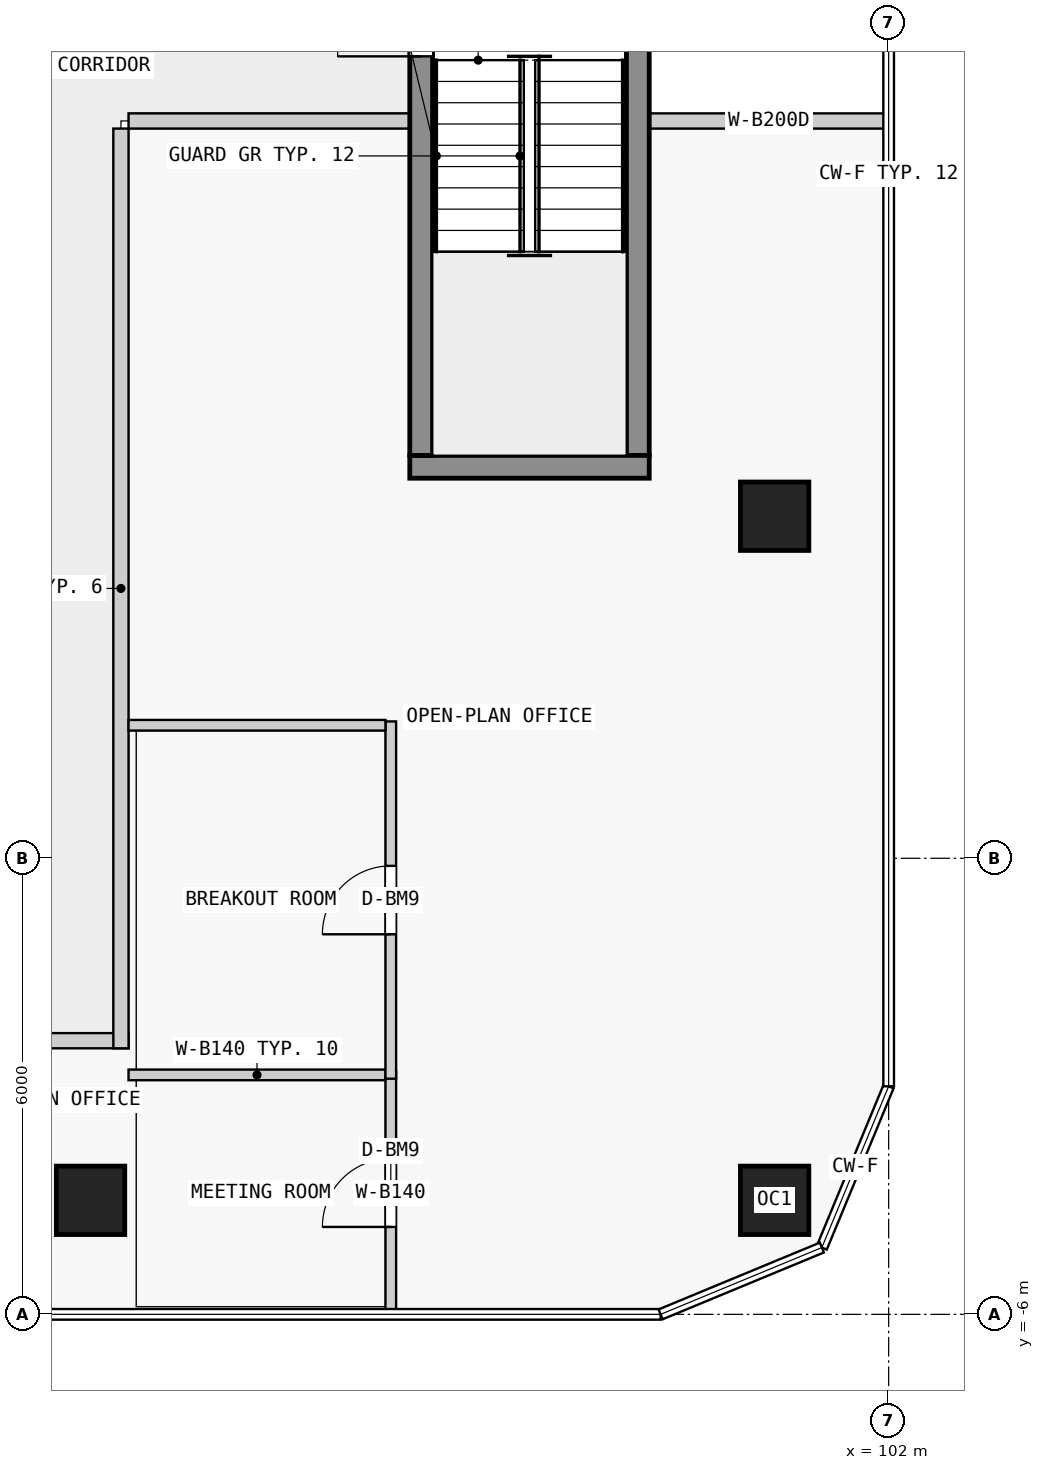
"""IFC4 building model, lengths in metres.
Left out: names, types, materials, properties, quantities, classifications, styles, units other than length and angle.
Written with IfcOpenShell. Run it as: python <this file> out.ifc"""

import sys

from ifc_helpers import new_model, si_unit, direction, frame, frame_2d, origin, origin_2d, place, context, subcontext, project, spatial, rectangle, extrude, element, fill, save


model = new_model("IFC4")
c1 = context("Model", 3, precision=1e-05, world=origin(), true_north=direction((0.0, 1.0)))
c2 = subcontext(c1, "Body", "Model", "MODEL_VIEW")
j1 = project(units=[si_unit("LENGTHUNIT", "METRE"), si_unit("PLANEANGLEUNIT", "RADIAN")], contexts=[c1])
p1 = place(None, origin())
s1 = spatial("IfcSite", under=j1, at=p1, CompositionType="ELEMENT")
p2 = place(p1, origin())
s2 = spatial("IfcBuilding", under=s1, at=p2, CompositionType="ELEMENT")
p3 = place(p2, frame((0.0, 0.0, 65.3)))
s3 = spatial("IfcBuildingStorey", under=s2, at=p3, CompositionType="ELEMENT", Elevation=65.3)
for number, where, z_axis, x_axis in (
    (1, (91.5, -4.5, 0.0), (0.0, 0.0, 1.0), (1.0, 0.0, 0.0)),
    (2, (100.5, -4.5, 0.0), (0.0, 0.0, 1.0), (1.0, 0.0, 0.0)),
    (3, (100.5, 4.5, 0.0), (0.0, 0.0, 1.0), (1.0, 0.0, 0.0)),
):
    element("IfcColumn", number, at=place(p3, frame(where, z_axis=z_axis, x_axis=x_axis)), inside=s3, PredefinedType="COLUMN", context=c2, shape_type="SweptSolid", body=[
        extrude(rectangle(XDim=0.9, YDim=0.9, at=origin_2d()), origin(), (0.0, 0.0, 1.0), 3.5),
    ])
p4 = place(p3, frame((95.85, 5.3, 0.0), z_axis=(0.0, 0.0, 1.0), x_axis=(0.0, 1.0, 0.0)))
e4 = element("IfcWall", 4, at=p4, inside=s3, PredefinedType="SHEAR", context=c2, shape_type="SweptSolid", body=[
    extrude(rectangle(XDim=6.4, YDim=0.3, at=frame_2d((3.2, 0.0))), origin(), (0.0, 0.0, 1.0), 3.25),
])
p5 = place(p4, frame((5.25, 0.0, 0.0)))
e5 = element("IfcOpeningElement", 5, at=p5, cuts=e4, PredefinedType="OPENING", context=c2, shape_type="SweptSolid", body=[
    extrude(rectangle(XDim=1.1, YDim=2.1, at=frame_2d((0.55, 1.05))), frame((0.0, 0.16, 0.0), z_axis=(0.0, -1.0, 0.0), x_axis=(1.0, 0.0, 0.0)), (0.0, 0.0, 1.0), 0.32),
])
p6 = place(p3, frame((98.7, 5.3, 0.0), z_axis=(0.0, 0.0, 1.0), x_axis=(0.0, 1.0, 0.0)))
e6 = element("IfcWall", 6, at=p6, inside=s3, PredefinedType="SHEAR", context=c2, shape_type="SweptSolid", body=[
    extrude(rectangle(XDim=6.4, YDim=0.3, at=frame_2d((3.2, 0.0))), origin(), (0.0, 0.0, 1.0), 3.25),
])
p7 = place(p3, frame((95.7, 5.15, 0.0), z_axis=(0.0, 0.0, 1.0), x_axis=(1.0, 0.0, 0.0)))
e7 = element("IfcWall", 7, at=p7, inside=s3, PredefinedType="SHEAR", context=c2, shape_type="SweptSolid", body=[
    extrude(rectangle(XDim=3.15, YDim=0.3, at=frame_2d((1.575, 0.0))), origin(), (0.0, 0.0, 1.0), 3.25),
])
p8 = place(p3, frame((72.0, -2.4, 0.0), z_axis=(0.0, 0.0, 1.0), x_axis=(1.0, 0.0, 0.0)))
e8 = element("IfcWall", 8, at=p8, inside=s3, PredefinedType="PARTITIONING", context=c2, shape_type="SweptSolid", body=[
    extrude(rectangle(XDim=20.0, YDim=0.2, at=frame_2d((10.0, 0.0))), origin(), (0.0, 0.0, 1.0), 3.25),
])
p9 = place(p8, frame((11.3, 0.0, 0.0)))
e9 = element("IfcOpeningElement", 9, at=p9, cuts=e8, PredefinedType="OPENING", context=c2, shape_type="SweptSolid", body=[
    extrude(rectangle(XDim=1.4, YDim=2.4, at=frame_2d((0.7, 1.2))), frame((0.0, 0.11, 0.0), z_axis=(0.0, -1.0, 0.0), x_axis=(1.0, 0.0, 0.0)), (0.0, 0.0, 1.0), 0.22),
])
p10 = place(p3, frame((91.9, -2.5, 0.0), z_axis=(0.0, 0.0, 1.0), x_axis=(0.0, 1.0, 0.0)))
e10 = element("IfcWall", 10, at=p10, inside=s3, PredefinedType="PARTITIONING", context=c2, shape_type="SweptSolid", body=[
    extrude(rectangle(XDim=12.1, YDim=0.2, at=frame_2d((6.05, 0.0))), origin(), (0.0, 0.0, 1.0), 3.25),
])
p11 = place(p3, frame((92.0, 9.7, 0.0), z_axis=(0.0, 0.0, 1.0), x_axis=(1.0, 0.0, 0.0)))
e11 = element("IfcWall", 11, at=p11, inside=s3, PredefinedType="PARTITIONING", context=c2, shape_type="SweptSolid", body=[
    extrude(rectangle(XDim=3.7, YDim=0.2, at=frame_2d((1.85, 0.0))), origin(), (0.0, 0.0, 1.0), 3.25),
])
p12 = place(p3, frame((98.85, 9.7, 0.0), z_axis=(0.0, 0.0, 1.0), x_axis=(1.0, 0.0, 0.0)))
e12 = element("IfcWall", 12, at=p12, inside=s3, PredefinedType="PARTITIONING", context=c2, shape_type="SweptSolid", body=[
    extrude(rectangle(XDim=3.15, YDim=0.2, at=frame_2d((1.575, 0.0))), origin(), (0.0, 0.0, 1.0), 3.25),
])
p13 = place(p3, frame((95.45, -6.0, 0.0), z_axis=(0.0, 0.0, 1.0), x_axis=(0.0, 1.0, 0.0)))
e13 = element("IfcWall", 13, at=p13, inside=s3, PredefinedType="PARTITIONING", context=c2, shape_type="SweptSolid", body=[
    extrude(rectangle(XDim=3.2, YDim=0.14, at=frame_2d((1.6, 0.0))), origin(), (0.0, 0.0, 1.0), 3.25),
])
p14 = place(p13, frame((1.15, 0.0, 0.0)))
e14 = element("IfcOpeningElement", 14, at=p14, cuts=e13, PredefinedType="OPENING", context=c2, shape_type="SweptSolid", body=[
    extrude(rectangle(XDim=0.9, YDim=2.4, at=frame_2d((0.45, 1.2))), frame((0.0, 0.08, 0.0), z_axis=(0.0, -1.0, 0.0), x_axis=(1.0, 0.0, 0.0)), (0.0, 0.0, 1.0), 0.16),
])
p15 = place(p3, frame((92.0, -2.85, 0.0), z_axis=(0.0, 0.0, 1.0), x_axis=(1.0, 0.0, 0.0)))
e15 = element("IfcWall", 15, at=p15, inside=s3, PredefinedType="PARTITIONING", context=c2, shape_type="SweptSolid", body=[
    extrude(rectangle(XDim=3.38, YDim=0.14, at=frame_2d((1.69, 0.0))), origin(), (0.0, 0.0, 1.0), 3.25),
])
p16 = place(p3, frame((95.45, -2.9, 0.0), z_axis=(0.0, 0.0, 1.0), x_axis=(0.0, 1.0, 0.0)))
e16 = element("IfcWall", 16, at=p16, inside=s3, PredefinedType="PARTITIONING", context=c2, shape_type="SweptSolid", body=[
    extrude(rectangle(XDim=4.7, YDim=0.14, at=frame_2d((2.35, 0.0))), origin(), (0.0, 0.0, 1.0), 3.25),
])
p17 = place(p16, frame((1.9, 0.0, 0.0)))
e17 = element("IfcOpeningElement", 17, at=p17, cuts=e16, PredefinedType="OPENING", context=c2, shape_type="SweptSolid", body=[
    extrude(rectangle(XDim=0.9, YDim=2.4, at=frame_2d((0.45, 1.2))), frame((0.0, 0.08, 0.0), z_axis=(0.0, -1.0, 0.0), x_axis=(1.0, 0.0, 0.0)), (0.0, 0.0, 1.0), 0.16),
])
p18 = place(p3, frame((92.0, 1.75, 0.0), z_axis=(0.0, 0.0, 1.0), x_axis=(1.0, 0.0, 0.0)))
e18 = element("IfcWall", 18, at=p18, inside=s3, PredefinedType="PARTITIONING", context=c2, shape_type="SweptSolid", body=[
    extrude(rectangle(XDim=3.38, YDim=0.14, at=frame_2d((1.69, 0.0))), origin(), (0.0, 0.0, 1.0), 3.25),
])
p19 = place(p5, origin())
e19 = element("IfcDoor", 19, at=p19, inside=s3, OperationType="SINGLE_SWING_LEFT", PredefinedType="DOOR", context=c2, shape_type="SweptSolid", body=[
    extrude(rectangle(XDim=1.1, YDim=2.1, at=frame_2d((0.55, 1.05))), frame((0.0, 0.025, 0.0), z_axis=(0.0, -1.0, 0.0), x_axis=(1.0, 0.0, 0.0)), (0.0, 0.0, 1.0), 0.05),
])
fill(e5, e19)
p20 = place(p14, origin())
e20 = element("IfcDoor", 20, at=p20, inside=s3, OperationType="SINGLE_SWING_LEFT", PredefinedType="DOOR", context=c2, shape_type="SweptSolid", body=[
    extrude(rectangle(XDim=0.9, YDim=2.4, at=frame_2d((0.45, 1.2))), frame((0.0, 0.025, 0.0), z_axis=(0.0, -1.0, 0.0), x_axis=(1.0, 0.0, 0.0)), (0.0, 0.0, 1.0), 0.05),
])
fill(e14, e20)
p21 = place(p17, origin())
e21 = element("IfcDoor", 21, at=p21, inside=s3, OperationType="SINGLE_SWING_LEFT", PredefinedType="DOOR", context=c2, shape_type="SweptSolid", body=[
    extrude(rectangle(XDim=0.9, YDim=2.4, at=frame_2d((0.45, 1.2))), frame((0.0, 0.025, 0.0), z_axis=(0.0, -1.0, 0.0), x_axis=(1.0, 0.0, 0.0)), (0.0, 0.0, 1.0), 0.05),
])
fill(e17, e21)
save(model, sys.argv[1])
